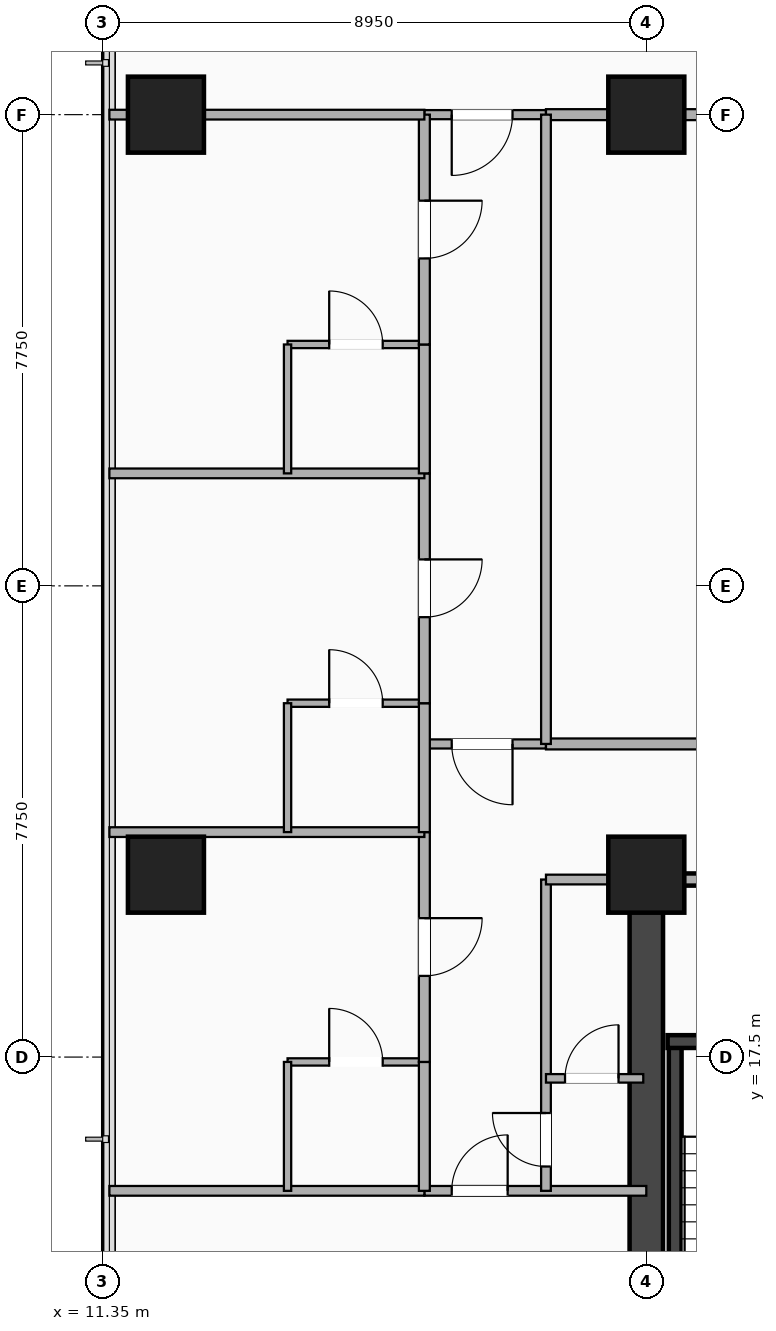
"""IFC4 building model, lengths in metres.
Left out: names, types, materials, properties, quantities, classifications, styles, units other than length and angle.
Written with IfcOpenShell. Run it as: python <this file> out.ifc"""

import sys

from ifc_helpers import new_model, si_unit, direction, frame, frame_2d, origin, origin_2d, place, context, subcontext, project, spatial, rectangle, extrude, element, fill, save


model = new_model("IFC4")
c1 = context("Model", 3, precision=1e-05, world=origin(), true_north=direction((0.0, 1.0)))
c2 = subcontext(c1, "Body", "Model", "MODEL_VIEW")
j1 = project(units=[si_unit("LENGTHUNIT", "METRE"), si_unit("PLANEANGLEUNIT", "RADIAN")], contexts=[c1])
p1 = place(None, origin())
s1 = spatial("IfcSite", under=j1, at=p1, CompositionType="ELEMENT")
p2 = place(p1, origin())
s2 = spatial("IfcBuilding", under=s1, at=p2, CompositionType="ELEMENT")
p3 = place(p2, frame((0.0, 0.0, 95.2)))
s3 = spatial("IfcBuildingStorey", under=s2, at=p3, CompositionType="ELEMENT", Elevation=95.2)
p4 = place(p3, frame((20.3, 3.5, 0.0), z_axis=(0.0, 0.0, 1.0), x_axis=(0.0, 1.0, 0.0)))
e1 = element("IfcWall", 1, at=p4, inside=s3, PredefinedType="SHEAR", context=c2, shape_type="SweptSolid", body=[
    extrude(rectangle(XDim=16.9, YDim=0.55, at=frame_2d((8.45, 0.0))), origin(), (0.0, 0.0, 1.0), 3.24),
])
p5 = place(p3, frame((20.775, 9.745, 0.0), z_axis=(0.0, 0.0, 1.0), x_axis=(0.0, 1.0, 0.0)))
e2 = element("IfcWall", 2, at=p5, inside=s3, PredefinedType="SHEAR", context=c2, shape_type="SweptSolid", body=[
    extrude(rectangle(XDim=8.01, YDim=0.21, at=frame_2d((4.005, 0.0))), origin(), (0.0, 0.0, 1.0), 3.24),
])
p6 = place(p3, frame((20.65, 17.755, 0.0), z_axis=(0.0, 0.0, 1.0), x_axis=(1.0, 0.0, 0.0)))
e3 = element("IfcWall", 3, at=p6, inside=s3, PredefinedType="SHEAR", context=c2, shape_type="SweptSolid", body=[
    extrude(rectangle(XDim=8.3, YDim=0.21, at=frame_2d((4.15, 0.0))), origin(), (0.0, 0.0, 1.0), 3.24),
])
p7 = place(p6, frame((2.2, 0.0, 0.0), z_axis=(0.0, 0.0, 1.0), x_axis=(-1.0, 0.0, 0.0)))
e4 = element("IfcOpeningElement", 4, at=p7, cuts=e3, PredefinedType="OPENING", context=c2, shape_type="SweptSolid", body=[
    extrude(rectangle(XDim=1.05, YDim=2.15, at=frame_2d((0.525, 1.075))), frame((0.0, 0.115, 0.0), z_axis=(0.0, -1.0, 0.0), x_axis=(1.0, 0.0, 0.0)), (0.0, 0.0, 1.0), 0.23),
])
p8 = place(p6, frame((4.15, 0.0, 0.0)))
e5 = element("IfcOpeningElement", 5, at=p8, cuts=e3, PredefinedType="OPENING", context=c2, shape_type="SweptSolid", body=[
    extrude(rectangle(XDim=1.1, YDim=2.18, at=frame_2d((0.55, 1.09))), frame((0.0, 0.115, 0.0), z_axis=(0.0, -1.0, 0.0), x_axis=(1.0, 0.0, 0.0)), (0.0, 0.0, 1.0), 0.23),
])
p9 = place(p6, frame((6.45, 0.0, 0.0)))
e6 = element("IfcOpeningElement", 6, at=p9, cuts=e3, PredefinedType="OPENING", context=c2, shape_type="SweptSolid", body=[
    extrude(rectangle(XDim=1.12, YDim=2.2, at=frame_2d((0.56, 1.1))), frame((0.0, 0.115, 0.0), z_axis=(0.0, -1.0, 0.0), x_axis=(1.0, 0.0, 0.0)), (0.0, 0.0, 1.0), 0.23),
])
for number, where, z_axis, x_axis in (
    (7, (20.3, 20.5, -0.26), (0.0, 0.0, 1.0), (1.0, 0.0, 0.0)),
    (8, (20.3, 33.0, -0.26), (0.0, 0.0, 1.0), (1.0, 0.0, 0.0)),
    (9, (12.4, 20.5, -0.26), (0.0, 0.0, 1.0), (1.0, 0.0, 0.0)),
    (10, (12.4, 33.0, -0.26), (0.0, 0.0, 1.0), (1.0, 0.0, 0.0)),
):
    element("IfcColumn", number, at=place(p3, frame(where, z_axis=z_axis, x_axis=x_axis)), inside=s3, PredefinedType="COLUMN", context=c2, shape_type="SweptSolid", body=[
        extrude(rectangle(XDim=1.25, YDim=1.25, at=origin_2d()), origin(), (0.0, 0.0, 1.0), 3.5),
    ])
p10 = place(p3, frame((20.65, 20.42, 0.0), z_axis=(0.0, 0.0, 1.0), x_axis=(1.0, 0.0, 0.0)))
e11 = element("IfcWall", 11, at=p10, inside=s3, PredefinedType="PARTITIONING", context=c2, shape_type="SweptSolid", body=[
    extrude(rectangle(XDim=5.73, YDim=0.2, at=frame_2d((2.865, 0.0))), origin(), (0.0, 0.0, 1.0), 2.313),
])
p11 = place(p10, frame((2.3, 0.0, 0.0)))
e12 = element("IfcOpeningElement", 12, at=p11, cuts=e11, PredefinedType="OPENING", context=c2, shape_type="SweptSolid", body=[
    extrude(rectangle(XDim=1.1, YDim=2.15, at=frame_2d((0.55, 1.075))), frame((0.0, 0.11, 0.0), z_axis=(0.0, -1.0, 0.0), x_axis=(1.0, 0.0, 0.0)), (0.0, 0.0, 1.0), 0.22),
])
p12 = place(p3, frame((16.65, 15.3, 0.0), z_axis=(0.0, 0.0, 1.0), x_axis=(1.0, 0.0, 0.0)))
e13 = element("IfcWall", 13, at=p12, inside=s3, PredefinedType="PARTITIONING", context=c2, shape_type="SweptSolid", body=[
    extrude(rectangle(XDim=3.65, YDim=0.16, at=frame_2d((1.825, 0.0))), origin(), (0.0, 0.0, 1.0), 2.313),
])
p13 = place(p12, frame((1.37, 0.0, 0.0), z_axis=(0.0, 0.0, 1.0), x_axis=(-1.0, 0.0, 0.0)))
e14 = element("IfcOpeningElement", 14, at=p13, cuts=e13, PredefinedType="OPENING", context=c2, shape_type="SweptSolid", body=[
    extrude(rectangle(XDim=0.92, YDim=2.08, at=frame_2d((0.46, 1.04))), frame((0.0, 0.09, 0.0), z_axis=(0.0, -1.0, 0.0), x_axis=(1.0, 0.0, 0.0)), (0.0, 0.0, 1.0), 0.18),
])
p14 = place(p3, frame((18.65, 15.3, 0.0), z_axis=(0.0, 0.0, 1.0), x_axis=(0.0, 1.0, 0.0)))
e15 = element("IfcWall", 15, at=p14, inside=s3, PredefinedType="PARTITIONING", context=c2, shape_type="SweptSolid", body=[
    extrude(rectangle(XDim=5.12, YDim=0.16, at=frame_2d((2.56, 0.0))), origin(), (0.0, 0.0, 1.0), 2.313),
])
p15 = place(p14, frame((1.28, 0.0, 0.0), z_axis=(0.0, 0.0, 1.0), x_axis=(-1.0, 0.0, 0.0)))
e16 = element("IfcOpeningElement", 16, at=p15, cuts=e15, PredefinedType="OPENING", context=c2, shape_type="SweptSolid", body=[
    extrude(rectangle(XDim=0.88, YDim=2.08, at=frame_2d((0.44, 1.04))), frame((0.0, 0.09, 0.0), z_axis=(0.0, -1.0, 0.0), x_axis=(1.0, 0.0, 0.0)), (0.0, 0.0, 1.0), 0.18),
])
p16 = place(p3, frame((18.65, 20.42, 0.0), z_axis=(0.0, 0.0, 1.0), x_axis=(1.0, 0.0, 0.0)))
e17 = element("IfcWall", 17, at=p16, inside=s3, PredefinedType="PARTITIONING", context=c2, shape_type="SweptSolid", body=[
    extrude(rectangle(XDim=1.65, YDim=0.16, at=frame_2d((0.825, 0.0))), origin(), (0.0, 0.0, 1.0), 2.313),
])
p17 = place(p3, frame((16.65, 22.65, 0.0), z_axis=(0.0, 0.0, 1.0), x_axis=(1.0, 0.0, 0.0)))
e18 = element("IfcWall", 18, at=p17, inside=s3, PredefinedType="PARTITIONING", context=c2, shape_type="SweptSolid", body=[
    extrude(rectangle(XDim=2.0, YDim=0.15, at=frame_2d((1.0, 0.0))), origin(), (0.0, 0.0, 1.0), 3.24),
])
p18 = place(p17, frame((0.45, 0.0, 0.0)))
e19 = element("IfcOpeningElement", 19, at=p18, cuts=e18, PredefinedType="OPENING", context=c2, shape_type="SweptSolid", body=[
    extrude(rectangle(XDim=1.0, YDim=2.15, at=frame_2d((0.5, 1.075))), frame((0.0, 0.085, 0.0), z_axis=(0.0, -1.0, 0.0), x_axis=(1.0, 0.0, 0.0)), (0.0, 0.0, 1.0), 0.17),
])
p19 = place(p3, frame((16.65, 33.0, 0.0), z_axis=(0.0, 0.0, 1.0), x_axis=(1.0, 0.0, 0.0)))
e20 = element("IfcWall", 20, at=p19, inside=s3, PredefinedType="PARTITIONING", context=c2, shape_type="SweptSolid", body=[
    extrude(rectangle(XDim=2.0, YDim=0.15, at=frame_2d((1.0, 0.0))), origin(), (0.0, 0.0, 1.0), 2.313),
])
p20 = place(p19, frame((0.45, 0.0, 0.0)))
e21 = element("IfcOpeningElement", 21, at=p20, cuts=e20, PredefinedType="OPENING", context=c2, shape_type="SweptSolid", body=[
    extrude(rectangle(XDim=1.0, YDim=2.15, at=frame_2d((0.5, 1.075))), frame((0.0, 0.085, 0.0), z_axis=(0.0, -1.0, 0.0), x_axis=(1.0, 0.0, 0.0)), (0.0, 0.0, 1.0), 0.17),
])
p21 = place(p3, frame((18.65, 22.65, 0.0), z_axis=(0.0, 0.0, 1.0), x_axis=(1.0, 0.0, 0.0)))
e22 = element("IfcWall", 22, at=p21, inside=s3, PredefinedType="PARTITIONING", context=c2, shape_type="SweptSolid", body=[
    extrude(rectangle(XDim=14.75, YDim=0.18, at=frame_2d((7.375, 0.0))), origin(), (0.0, 0.0, 1.0), 2.313),
])
p22 = place(p21, frame((6.9, 0.0, 0.0)))
e23 = element("IfcOpeningElement", 23, at=p22, cuts=e22, PredefinedType="OPENING", context=c2, shape_type="SweptSolid", body=[
    extrude(rectangle(XDim=0.95, YDim=2.15, at=frame_2d((0.475, 1.075))), frame((0.0, 0.1, 0.0), z_axis=(0.0, -1.0, 0.0), x_axis=(1.0, 0.0, 0.0)), (0.0, 0.0, 1.0), 0.2),
])
p23 = place(p3, frame((18.65, 33.0, 0.0), z_axis=(0.0, 0.0, 1.0), x_axis=(1.0, 0.0, 0.0)))
e24 = element("IfcWall", 24, at=p23, inside=s3, PredefinedType="PARTITIONING", context=c2, shape_type="SweptSolid", body=[
    extrude(rectangle(XDim=14.75, YDim=0.18, at=frame_2d((7.375, 0.0))), origin(), (0.0, 0.0, 1.0), 2.313),
])
p24 = place(p3, frame((18.65, 22.65, 0.0), z_axis=(0.0, 0.0, 1.0), x_axis=(0.0, 1.0, 0.0)))
e25 = element("IfcWall", 25, at=p24, inside=s3, PredefinedType="PARTITIONING", context=c2, shape_type="SweptSolid", body=[
    extrude(rectangle(XDim=10.35, YDim=0.16, at=frame_2d((5.175, 0.0))), origin(), (0.0, 0.0, 1.0), 2.313),
])
p25 = place(p3, frame((11.47, 15.3, 0.0), z_axis=(0.0, 0.0, 1.0), x_axis=(1.0, 0.0, 0.0)))
e26 = element("IfcWall", 26, at=p25, inside=s3, PredefinedType="PARTITIONING", context=c2, shape_type="SweptSolid", body=[
    extrude(rectangle(XDim=5.18, YDim=0.16, at=frame_2d((2.59, 0.0))), origin(), (0.0, 0.0, 1.0), 2.603),
])
p26 = place(p3, frame((14.4, 17.42, 0.0), z_axis=(0.0, 0.0, 1.0), x_axis=(1.0, 0.0, 0.0)))
e27 = element("IfcWall", 27, at=p26, inside=s3, PredefinedType="PARTITIONING", context=c2, shape_type="SweptSolid", body=[
    extrude(rectangle(XDim=2.25, YDim=0.12, at=frame_2d((1.125, 0.0))), origin(), (0.0, 0.0, 1.0), 3.24),
])
p27 = place(p26, frame((1.565, 0.0, 0.0), z_axis=(0.0, 0.0, 1.0), x_axis=(-1.0, 0.0, 0.0)))
e28 = element("IfcOpeningElement", 28, at=p27, cuts=e27, PredefinedType="OPENING", context=c2, shape_type="SweptSolid", body=[
    extrude(rectangle(XDim=0.88, YDim=2.08, at=frame_2d((0.44, 1.04))), frame((0.0, 0.07, 0.0), z_axis=(0.0, -1.0, 0.0), x_axis=(1.0, 0.0, 0.0)), (0.0, 0.0, 1.0), 0.14),
])
p28 = place(p3, frame((14.4, 15.3, 0.0), z_axis=(0.0, 0.0, 1.0), x_axis=(0.0, 1.0, 0.0)))
e29 = element("IfcWall", 29, at=p28, inside=s3, PredefinedType="PARTITIONING", context=c2, shape_type="SweptSolid", body=[
    extrude(rectangle(XDim=2.12, YDim=0.12, at=frame_2d((1.06, 0.0))), origin(), (0.0, 0.0, 1.0), 2.922),
])
p29 = place(p3, frame((16.65, 15.3, 0.0), z_axis=(0.0, 0.0, 1.0), x_axis=(0.0, 1.0, 0.0)))
e30 = element("IfcWall", 30, at=p29, inside=s3, PredefinedType="PARTITIONING", context=c2, shape_type="SweptSolid", body=[
    extrude(rectangle(XDim=2.12, YDim=0.18, at=frame_2d((1.06, 0.0))), origin(), (0.0, 0.0, 1.0), 2.922),
])
p30 = place(p3, frame((16.65, 17.42, 0.0), z_axis=(0.0, 0.0, 1.0), x_axis=(0.0, 1.0, 0.0)))
e31 = element("IfcWall", 31, at=p30, inside=s3, PredefinedType="PARTITIONING", context=c2, shape_type="SweptSolid", body=[
    extrude(rectangle(XDim=3.78, YDim=0.18, at=frame_2d((1.89, 0.0))), origin(), (0.0, 0.0, 1.0), 2.313),
])
p31 = place(p30, frame((1.415, 0.0, 0.0)))
e32 = element("IfcOpeningElement", 32, at=p31, cuts=e31, PredefinedType="OPENING", context=c2, shape_type="SweptSolid", body=[
    extrude(rectangle(XDim=0.95, YDim=2.15, at=frame_2d((0.475, 1.075))), frame((0.0, 0.1, 0.0), z_axis=(0.0, -1.0, 0.0), x_axis=(1.0, 0.0, 0.0)), (0.0, 0.0, 1.0), 0.2),
])
p32 = place(p3, frame((11.47, 21.2, 0.0), z_axis=(0.0, 0.0, 1.0), x_axis=(1.0, 0.0, 0.0)))
e33 = element("IfcWall", 33, at=p32, inside=s3, PredefinedType="PARTITIONING", context=c2, shape_type="SweptSolid", body=[
    extrude(rectangle(XDim=5.18, YDim=0.16, at=frame_2d((2.59, 0.0))), origin(), (0.0, 0.0, 1.0), 2.603),
])
p33 = place(p3, frame((14.4, 23.32, 0.0), z_axis=(0.0, 0.0, 1.0), x_axis=(1.0, 0.0, 0.0)))
e34 = element("IfcWall", 34, at=p33, inside=s3, PredefinedType="PARTITIONING", context=c2, shape_type="SweptSolid", body=[
    extrude(rectangle(XDim=2.25, YDim=0.12, at=frame_2d((1.125, 0.0))), origin(), (0.0, 0.0, 1.0), 3.24),
])
p34 = place(p33, frame((1.565, 0.0, 0.0), z_axis=(0.0, 0.0, 1.0), x_axis=(-1.0, 0.0, 0.0)))
e35 = element("IfcOpeningElement", 35, at=p34, cuts=e34, PredefinedType="OPENING", context=c2, shape_type="SweptSolid", body=[
    extrude(rectangle(XDim=0.88, YDim=2.08, at=frame_2d((0.44, 1.04))), frame((0.0, 0.07, 0.0), z_axis=(0.0, -1.0, 0.0), x_axis=(1.0, 0.0, 0.0)), (0.0, 0.0, 1.0), 0.14),
])
p35 = place(p3, frame((14.4, 21.2, 0.0), z_axis=(0.0, 0.0, 1.0), x_axis=(0.0, 1.0, 0.0)))
e36 = element("IfcWall", 36, at=p35, inside=s3, PredefinedType="PARTITIONING", context=c2, shape_type="SweptSolid", body=[
    extrude(rectangle(XDim=2.12, YDim=0.12, at=frame_2d((1.06, 0.0))), origin(), (0.0, 0.0, 1.0), 3.24),
])
p36 = place(p3, frame((16.65, 21.2, 0.0), z_axis=(0.0, 0.0, 1.0), x_axis=(0.0, 1.0, 0.0)))
e37 = element("IfcWall", 37, at=p36, inside=s3, PredefinedType="PARTITIONING", context=c2, shape_type="SweptSolid", body=[
    extrude(rectangle(XDim=2.12, YDim=0.18, at=frame_2d((1.06, 0.0))), origin(), (0.0, 0.0, 1.0), 3.24),
])
p37 = place(p3, frame((16.65, 23.32, 0.0), z_axis=(0.0, 0.0, 1.0), x_axis=(0.0, 1.0, 0.0)))
e38 = element("IfcWall", 38, at=p37, inside=s3, PredefinedType="PARTITIONING", context=c2, shape_type="SweptSolid", body=[
    extrude(rectangle(XDim=3.78, YDim=0.18, at=frame_2d((1.89, 0.0))), origin(), (0.0, 0.0, 1.0), 2.818),
])
p38 = place(p37, frame((1.415, 0.0, 0.0)))
e39 = element("IfcOpeningElement", 39, at=p38, cuts=e38, PredefinedType="OPENING", context=c2, shape_type="SweptSolid", body=[
    extrude(rectangle(XDim=0.95, YDim=2.15, at=frame_2d((0.475, 1.075))), frame((0.0, 0.1, 0.0), z_axis=(0.0, -1.0, 0.0), x_axis=(1.0, 0.0, 0.0)), (0.0, 0.0, 1.0), 0.2),
])
p39 = place(p3, frame((11.47, 27.1, 0.0), z_axis=(0.0, 0.0, 1.0), x_axis=(1.0, 0.0, 0.0)))
e40 = element("IfcWall", 40, at=p39, inside=s3, PredefinedType="PARTITIONING", context=c2, shape_type="SweptSolid", body=[
    extrude(rectangle(XDim=5.18, YDim=0.16, at=frame_2d((2.59, 0.0))), origin(), (0.0, 0.0, 1.0), 2.603),
])
p40 = place(p3, frame((14.4, 29.22, 0.0), z_axis=(0.0, 0.0, 1.0), x_axis=(1.0, 0.0, 0.0)))
e41 = element("IfcWall", 41, at=p40, inside=s3, PredefinedType="PARTITIONING", context=c2, shape_type="SweptSolid", body=[
    extrude(rectangle(XDim=2.25, YDim=0.12, at=frame_2d((1.125, 0.0))), origin(), (0.0, 0.0, 1.0), 3.24),
])
p41 = place(p40, frame((1.565, 0.0, 0.0), z_axis=(0.0, 0.0, 1.0), x_axis=(-1.0, 0.0, 0.0)))
e42 = element("IfcOpeningElement", 42, at=p41, cuts=e41, PredefinedType="OPENING", context=c2, shape_type="SweptSolid", body=[
    extrude(rectangle(XDim=0.88, YDim=2.08, at=frame_2d((0.44, 1.04))), frame((0.0, 0.07, 0.0), z_axis=(0.0, -1.0, 0.0), x_axis=(1.0, 0.0, 0.0)), (0.0, 0.0, 1.0), 0.14),
])
p42 = place(p3, frame((14.4, 27.1, 0.0), z_axis=(0.0, 0.0, 1.0), x_axis=(0.0, 1.0, 0.0)))
e43 = element("IfcWall", 43, at=p42, inside=s3, PredefinedType="PARTITIONING", context=c2, shape_type="SweptSolid", body=[
    extrude(rectangle(XDim=2.12, YDim=0.12, at=frame_2d((1.06, 0.0))), origin(), (0.0, 0.0, 1.0), 2.818),
])
p43 = place(p3, frame((16.65, 27.1, 0.0), z_axis=(0.0, 0.0, 1.0), x_axis=(0.0, 1.0, 0.0)))
e44 = element("IfcWall", 44, at=p43, inside=s3, PredefinedType="PARTITIONING", context=c2, shape_type="SweptSolid", body=[
    extrude(rectangle(XDim=2.12, YDim=0.18, at=frame_2d((1.06, 0.0))), origin(), (0.0, 0.0, 1.0), 2.818),
])
p44 = place(p3, frame((16.65, 29.22, 0.0), z_axis=(0.0, 0.0, 1.0), x_axis=(0.0, 1.0, 0.0)))
e45 = element("IfcWall", 45, at=p44, inside=s3, PredefinedType="PARTITIONING", context=c2, shape_type="SweptSolid", body=[
    extrude(rectangle(XDim=3.78, YDim=0.18, at=frame_2d((1.89, 0.0))), origin(), (0.0, 0.0, 1.0), 2.313),
])
p45 = place(p44, frame((1.415, 0.0, 0.0)))
e46 = element("IfcOpeningElement", 46, at=p45, cuts=e45, PredefinedType="OPENING", context=c2, shape_type="SweptSolid", body=[
    extrude(rectangle(XDim=0.95, YDim=2.15, at=frame_2d((0.475, 1.075))), frame((0.0, 0.1, 0.0), z_axis=(0.0, -1.0, 0.0), x_axis=(1.0, 0.0, 0.0)), (0.0, 0.0, 1.0), 0.2),
])
p46 = place(p3, frame((11.47, 33.0, 0.0), z_axis=(0.0, 0.0, 1.0), x_axis=(1.0, 0.0, 0.0)))
e47 = element("IfcWall", 47, at=p46, inside=s3, PredefinedType="PARTITIONING", context=c2, shape_type="SweptSolid", body=[
    extrude(rectangle(XDim=5.18, YDim=0.16, at=frame_2d((2.59, 0.0))), origin(), (0.0, 0.0, 1.0), 2.313),
])
p47 = place(p3, frame((18.65, 17.15, 0.0), z_axis=(0.0, 0.0, 1.0), x_axis=(1.0, 0.0, 0.0)))
e48 = element("IfcWall", 48, at=p47, inside=s3, PredefinedType="PARTITIONING", context=c2, shape_type="SweptSolid", body=[
    extrude(rectangle(XDim=1.6, YDim=0.14, at=frame_2d((0.8, 0.0))), origin(), (0.0, 0.0, 1.0), 2.313),
])
p48 = place(p47, frame((1.193, 0.0, 0.0), z_axis=(0.0, 0.0, 1.0), x_axis=(-1.0, 0.0, 0.0)))
e49 = element("IfcOpeningElement", 49, at=p48, cuts=e48, PredefinedType="OPENING", context=c2, shape_type="SweptSolid", body=[
    extrude(rectangle(XDim=0.88, YDim=2.08, at=frame_2d((0.44, 1.04))), frame((0.0, 0.08, 0.0), z_axis=(0.0, -1.0, 0.0), x_axis=(1.0, 0.0, 0.0)), (0.0, 0.0, 1.0), 0.16),
])
p49 = place(p13, origin())
e50 = element("IfcDoor", 50, at=p49, inside=s3, OperationType="SINGLE_SWING_RIGHT", PredefinedType="DOOR", context=c2, shape_type="SweptSolid", body=[
    extrude(rectangle(XDim=0.92, YDim=2.08, at=frame_2d((0.46, 1.04))), frame((0.0, 0.025, 0.0), z_axis=(0.0, -1.0, 0.0), x_axis=(1.0, 0.0, 0.0)), (0.0, 0.0, 1.0), 0.05),
])
fill(e14, e50)
p50 = place(p15, origin())
e51 = element("IfcDoor", 51, at=p50, inside=s3, OperationType="SINGLE_SWING_RIGHT", PredefinedType="DOOR", context=c2, shape_type="SweptSolid", body=[
    extrude(rectangle(XDim=0.88, YDim=2.08, at=frame_2d((0.44, 1.04))), frame((0.0, 0.025, 0.0), z_axis=(0.0, -1.0, 0.0), x_axis=(1.0, 0.0, 0.0)), (0.0, 0.0, 1.0), 0.05),
])
fill(e16, e51)
p51 = place(p18, origin())
e52 = element("IfcDoor", 52, at=p51, inside=s3, OperationType="SINGLE_SWING_RIGHT", PredefinedType="DOOR", context=c2, shape_type="SweptSolid", body=[
    extrude(rectangle(XDim=1.0, YDim=2.15, at=frame_2d((0.5, 1.075))), frame((0.0, 0.025, 0.0), z_axis=(0.0, -1.0, 0.0), x_axis=(1.0, 0.0, 0.0)), (0.0, 0.0, 1.0), 0.05),
])
fill(e19, e52)
p52 = place(p20, origin())
e53 = element("IfcDoor", 53, at=p52, inside=s3, OperationType="SINGLE_SWING_LEFT", PredefinedType="DOOR", context=c2, shape_type="SweptSolid", body=[
    extrude(rectangle(XDim=1.0, YDim=2.15, at=frame_2d((0.5, 1.075))), frame((0.0, 0.025, 0.0), z_axis=(0.0, -1.0, 0.0), x_axis=(1.0, 0.0, 0.0)), (0.0, 0.0, 1.0), 0.05),
])
fill(e21, e53)
p53 = place(p27, origin())
e54 = element("IfcDoor", 54, at=p53, inside=s3, OperationType="SINGLE_SWING_LEFT", PredefinedType="DOOR", context=c2, shape_type="SweptSolid", body=[
    extrude(rectangle(XDim=0.88, YDim=2.08, at=frame_2d((0.44, 1.04))), frame((0.0, 0.025, 0.0), z_axis=(0.0, -1.0, 0.0), x_axis=(1.0, 0.0, 0.0)), (0.0, 0.0, 1.0), 0.05),
])
fill(e28, e54)
p54 = place(p31, origin())
e55 = element("IfcDoor", 55, at=p54, inside=s3, OperationType="SINGLE_SWING_RIGHT", PredefinedType="DOOR", context=c2, shape_type="SweptSolid", body=[
    extrude(rectangle(XDim=0.95, YDim=2.15, at=frame_2d((0.475, 1.075))), frame((0.0, 0.025, 0.0), z_axis=(0.0, -1.0, 0.0), x_axis=(1.0, 0.0, 0.0)), (0.0, 0.0, 1.0), 0.05),
])
fill(e32, e55)
p55 = place(p34, origin())
e56 = element("IfcDoor", 56, at=p55, inside=s3, OperationType="SINGLE_SWING_LEFT", PredefinedType="DOOR", context=c2, shape_type="SweptSolid", body=[
    extrude(rectangle(XDim=0.88, YDim=2.08, at=frame_2d((0.44, 1.04))), frame((0.0, 0.025, 0.0), z_axis=(0.0, -1.0, 0.0), x_axis=(1.0, 0.0, 0.0)), (0.0, 0.0, 1.0), 0.05),
])
fill(e35, e56)
p56 = place(p38, origin())
e57 = element("IfcDoor", 57, at=p56, inside=s3, OperationType="SINGLE_SWING_RIGHT", PredefinedType="DOOR", context=c2, shape_type="SweptSolid", body=[
    extrude(rectangle(XDim=0.95, YDim=2.15, at=frame_2d((0.475, 1.075))), frame((0.0, 0.025, 0.0), z_axis=(0.0, -1.0, 0.0), x_axis=(1.0, 0.0, 0.0)), (0.0, 0.0, 1.0), 0.05),
])
fill(e39, e57)
p57 = place(p41, origin())
e58 = element("IfcDoor", 58, at=p57, inside=s3, OperationType="SINGLE_SWING_LEFT", PredefinedType="DOOR", context=c2, shape_type="SweptSolid", body=[
    extrude(rectangle(XDim=0.88, YDim=2.08, at=frame_2d((0.44, 1.04))), frame((0.0, 0.025, 0.0), z_axis=(0.0, -1.0, 0.0), x_axis=(1.0, 0.0, 0.0)), (0.0, 0.0, 1.0), 0.05),
])
fill(e42, e58)
p58 = place(p45, origin())
e59 = element("IfcDoor", 59, at=p58, inside=s3, OperationType="SINGLE_SWING_RIGHT", PredefinedType="DOOR", context=c2, shape_type="SweptSolid", body=[
    extrude(rectangle(XDim=0.95, YDim=2.15, at=frame_2d((0.475, 1.075))), frame((0.0, 0.025, 0.0), z_axis=(0.0, -1.0, 0.0), x_axis=(1.0, 0.0, 0.0)), (0.0, 0.0, 1.0), 0.05),
])
fill(e46, e59)
p59 = place(p48, origin())
e60 = element("IfcDoor", 60, at=p59, inside=s3, OperationType="SINGLE_SWING_RIGHT", PredefinedType="DOOR", context=c2, shape_type="SweptSolid", body=[
    extrude(rectangle(XDim=0.88, YDim=2.08, at=frame_2d((0.44, 1.04))), frame((0.0, 0.025, 0.0), z_axis=(0.0, -1.0, 0.0), x_axis=(1.0, 0.0, 0.0)), (0.0, 0.0, 1.0), 0.05),
])
fill(e49, e60)
save(model, sys.argv[1])
